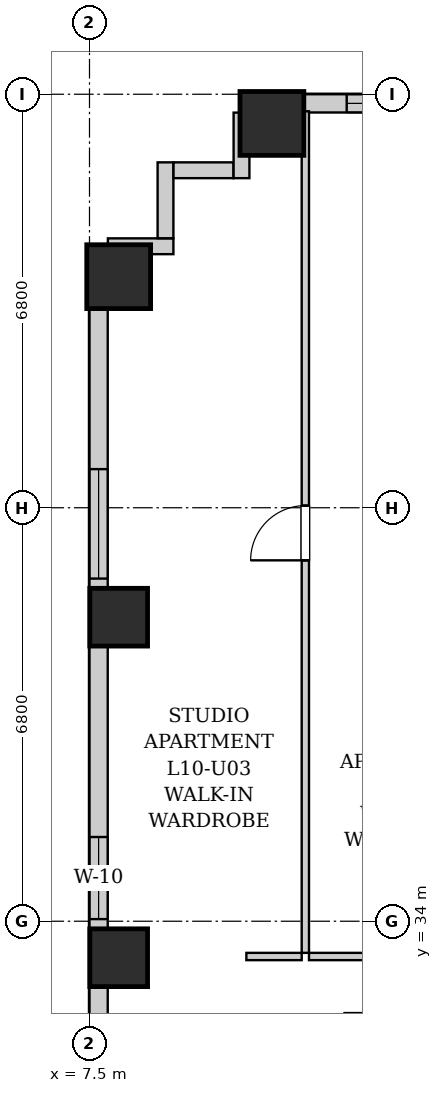
"""IFC4 building model, lengths in metres.
Left out: names, types, materials, properties, quantities, classifications, styles, units other than length and angle.
Written with IfcOpenShell. Run it as: python <this file> out.ifc"""

import sys

from ifc_helpers import new_model, si_unit, direction, frame, frame_2d, origin, origin_2d, place, context, subcontext, project, spatial, rectangle, extrude, element, fill, save


model = new_model("IFC4")
c1 = context("Model", 3, precision=1e-05, world=origin(), true_north=direction((0.0, 1.0)))
c2 = subcontext(c1, "Body", "Model", "MODEL_VIEW")
j1 = project(units=[si_unit("LENGTHUNIT", "METRE"), si_unit("PLANEANGLEUNIT", "RADIAN")], contexts=[c1])
p1 = place(None, origin())
s1 = spatial("IfcSite", under=j1, at=p1, CompositionType="ELEMENT")
p2 = place(p1, origin())
s2 = spatial("IfcBuilding", under=s1, at=p2, CompositionType="ELEMENT")
p3 = place(p2, frame((0.0, 0.0, 41.8)))
s3 = spatial("IfcBuildingStorey", under=s2, at=p3, CompositionType="ELEMENT", Elevation=41.8)
p4 = place(p3, frame((10.5, 47.12, 0.0), z_axis=(0.0, 0.0, 1.0), x_axis=(1.0, 0.0, 0.0)))
e1 = element("IfcColumn", 1, at=p4, inside=s3, PredefinedType="COLUMN", context=c2, shape_type="SweptSolid", body=[
    extrude(rectangle(XDim=1.05, YDim=1.05, at=origin_2d()), origin(), (0.0, 0.0, 1.0), 3.2),
])
for number, where, z_axis, x_axis in (
    (2, (7.98, 33.4, 0.0), (0.0, 0.0, 1.0), (1.0, 0.0, 0.0)),
    (3, (7.98, 39.0, 0.0), (0.0, 0.0, 1.0), (1.0, 0.0, 0.0)),
):
    element("IfcColumn", number, at=place(p3, frame(where, z_axis=z_axis, x_axis=x_axis)), inside=s3, PredefinedType="COLUMN", context=c2, shape_type="SweptSolid", body=[
        extrude(rectangle(XDim=0.95, YDim=0.95, at=origin_2d()), origin(), (0.0, 0.0, 1.0), 3.2),
    ])
p5 = place(p3, frame((7.98, 44.6, 0.0), z_axis=(0.0, 0.0, 1.0), x_axis=(1.0, 0.0, 0.0)))
e4 = element("IfcColumn", 4, at=p5, inside=s3, PredefinedType="COLUMN", context=c2, shape_type="SweptSolid", body=[
    extrude(rectangle(XDim=1.05, YDim=1.05, at=origin_2d()), origin(), (0.0, 0.0, 1.0), 3.2),
])
p6 = place(p3, frame((10.0, 47.45, 0.0), z_axis=(0.0, 0.0, 1.0), x_axis=(1.0, 0.0, 0.0)))
e5 = element("IfcWall", 5, at=p6, inside=s3, PredefinedType="SOLIDWALL", context=c2, shape_type="SweptSolid", body=[
    extrude(rectangle(XDim=25.7, YDim=0.3, at=frame_2d((12.85, 0.0))), origin(), (0.0, 0.0, 1.0), 1.975),
])
p7 = place(p6, frame((1.73, 0.0, 0.55)))
e6 = element("IfcOpeningElement", 6, at=p7, cuts=e5, PredefinedType="OPENING", context=c2, shape_type="SweptSolid", body=[
    extrude(rectangle(XDim=1.8, YDim=1.2, at=frame_2d((0.9, 0.6))), frame((0.0, 0.16, 0.0), z_axis=(0.0, -1.0, 0.0), x_axis=(1.0, 0.0, 0.0)), (0.0, 0.0, 1.0), 0.32),
])
p8 = place(p6, frame((4.961, 0.0, 0.55)))
e7 = element("IfcOpeningElement", 7, at=p8, cuts=e5, PredefinedType="OPENING", context=c2, shape_type="SweptSolid", body=[
    extrude(rectangle(XDim=1.8, YDim=1.2, at=frame_2d((0.9, 0.6))), frame((0.0, 0.16, 0.0), z_axis=(0.0, -1.0, 0.0), x_axis=(1.0, 0.0, 0.0)), (0.0, 0.0, 1.0), 0.32),
])
p9 = place(p6, frame((8.435, 0.0, 0.55)))
e8 = element("IfcOpeningElement", 8, at=p9, cuts=e5, PredefinedType="OPENING", context=c2, shape_type="SweptSolid", body=[
    extrude(rectangle(XDim=1.8, YDim=1.2, at=frame_2d((0.9, 0.6))), frame((0.0, 0.16, 0.0), z_axis=(0.0, -1.0, 0.0), x_axis=(1.0, 0.0, 0.0)), (0.0, 0.0, 1.0), 0.32),
])
p10 = place(p6, frame((11.15, 0.0, 0.55)))
e9 = element("IfcOpeningElement", 9, at=p10, cuts=e5, PredefinedType="OPENING", context=c2, shape_type="SweptSolid", body=[
    extrude(rectangle(XDim=1.35, YDim=1.2, at=frame_2d((0.675, 0.6))), frame((0.0, 0.16, 0.0), z_axis=(0.0, -1.0, 0.0), x_axis=(1.0, 0.0, 0.0)), (0.0, 0.0, 1.0), 0.32),
])
p11 = place(p6, frame((17.812, 0.0, 0.55)))
e10 = element("IfcOpeningElement", 10, at=p11, cuts=e5, PredefinedType="OPENING", context=c2, shape_type="SweptSolid", body=[
    extrude(rectangle(XDim=1.8, YDim=1.2, at=frame_2d((0.9, 0.6))), frame((0.0, 0.16, 0.0), z_axis=(0.0, -1.0, 0.0), x_axis=(1.0, 0.0, 0.0)), (0.0, 0.0, 1.0), 0.32),
])
p12 = place(p6, frame((20.765, 0.0, 0.55)))
e11 = element("IfcOpeningElement", 11, at=p12, cuts=e5, PredefinedType="OPENING", context=c2, shape_type="SweptSolid", body=[
    extrude(rectangle(XDim=1.8, YDim=1.2, at=frame_2d((0.9, 0.6))), frame((0.0, 0.16, 0.0), z_axis=(0.0, -1.0, 0.0), x_axis=(1.0, 0.0, 0.0)), (0.0, 0.0, 1.0), 0.32),
])
p13 = place(p6, frame((23.835, 0.0, 0.55)))
e12 = element("IfcOpeningElement", 12, at=p13, cuts=e5, PredefinedType="OPENING", context=c2, shape_type="SweptSolid", body=[
    extrude(rectangle(XDim=1.35, YDim=1.2, at=frame_2d((0.675, 0.6))), frame((0.0, 0.16, 0.0), z_axis=(0.0, -1.0, 0.0), x_axis=(1.0, 0.0, 0.0)), (0.0, 0.0, 1.0), 0.32),
])
p14 = place(p3, frame((7.65, 19.4, 0.0), z_axis=(0.0, 0.0, 1.0), x_axis=(0.0, 1.0, 0.0)))
e13 = element("IfcWall", 13, at=p14, inside=s3, PredefinedType="SOLIDWALL", context=c2, shape_type="SweptSolid", body=[
    extrude(rectangle(XDim=25.7, YDim=0.3, at=frame_2d((12.85, 0.0))), origin(), (0.0, 0.0, 1.0), 1.975),
])
p15 = place(p14, frame((20.235, 0.0, 0.55)))
e14 = element("IfcOpeningElement", 14, at=p15, cuts=e13, PredefinedType="OPENING", context=c2, shape_type="SweptSolid", body=[
    extrude(rectangle(XDim=1.8, YDim=1.2, at=frame_2d((0.9, 0.6))), frame((0.0, 0.16, 0.0), z_axis=(0.0, -1.0, 0.0), x_axis=(1.0, 0.0, 0.0)), (0.0, 0.0, 1.0), 0.32),
])
p16 = place(p14, frame((14.635, 0.0, 0.55)))
e15 = element("IfcOpeningElement", 15, at=p16, cuts=e13, PredefinedType="OPENING", context=c2, shape_type="SweptSolid", body=[
    extrude(rectangle(XDim=1.35, YDim=1.2, at=frame_2d((0.675, 0.6))), frame((0.0, 0.16, 0.0), z_axis=(0.0, -1.0, 0.0), x_axis=(1.0, 0.0, 0.0)), (0.0, 0.0, 1.0), 0.32),
])
p17 = place(p14, frame((5.1, 0.0, 0.55)))
e16 = element("IfcOpeningElement", 16, at=p17, cuts=e13, PredefinedType="OPENING", context=c2, shape_type="SweptSolid", body=[
    extrude(rectangle(XDim=1.8, YDim=1.2, at=frame_2d((0.9, 0.6))), frame((0.0, 0.16, 0.0), z_axis=(0.0, -1.0, 0.0), x_axis=(1.0, 0.0, 0.0)), (0.0, 0.0, 1.0), 0.32),
])
p18 = place(p14, frame((7.16, 0.0, 0.55)))
e17 = element("IfcOpeningElement", 17, at=p18, cuts=e13, PredefinedType="OPENING", context=c2, shape_type="SweptSolid", body=[
    extrude(rectangle(XDim=1.35, YDim=1.2, at=frame_2d((0.675, 0.6))), frame((0.0, 0.16, 0.0), z_axis=(0.0, -1.0, 0.0), x_axis=(1.0, 0.0, 0.0)), (0.0, 0.0, 1.0), 0.32),
])
p19 = place(p3, frame((7.802, 45.1, 0.0), z_axis=(0.0, 0.0, 1.0), x_axis=(1.0, 0.0, 0.0)))
e18 = element("IfcWall", 18, at=p19, inside=s3, PredefinedType="SOLIDWALL", context=c2, shape_type="SweptSolid", body=[
    extrude(rectangle(XDim=1.078, YDim=0.26, at=frame_2d((0.539, 0.0))), origin(), (0.0, 0.0, 1.0), 2.94),
])
p20 = place(p3, frame((8.75, 45.232, 0.0), z_axis=(0.0, 0.0, 1.0), x_axis=(0.0, 1.0, 0.0)))
e19 = element("IfcWall", 19, at=p20, inside=s3, PredefinedType="SOLIDWALL", context=c2, shape_type="SweptSolid", body=[
    extrude(rectangle(XDim=1.248, YDim=0.26, at=frame_2d((0.624, 0.0))), origin(), (0.0, 0.0, 1.0), 2.94),
])
p21 = place(p3, frame((8.882, 46.35, 0.0), z_axis=(0.0, 0.0, 1.0), x_axis=(1.0, 0.0, 0.0)))
e20 = element("IfcWall", 20, at=p21, inside=s3, PredefinedType="SOLIDWALL", context=c2, shape_type="SweptSolid", body=[
    extrude(rectangle(XDim=0.986, YDim=0.26, at=frame_2d((0.493, 0.0))), origin(), (0.0, 0.0, 1.0), 2.94),
])
p22 = place(p3, frame((10.0, 46.22, 0.0), z_axis=(0.0, 0.0, 1.0), x_axis=(0.0, 1.0, 0.0)))
e21 = element("IfcWall", 21, at=p22, inside=s3, PredefinedType="SOLIDWALL", context=c2, shape_type="SweptSolid", body=[
    extrude(rectangle(XDim=1.078, YDim=0.26, at=frame_2d((0.539, 0.0))), origin(), (0.0, 0.0, 1.0), 2.94),
])
p23 = place(p3, frame((10.08, 33.42, 0.0), z_axis=(0.0, 0.0, 1.0), x_axis=(1.0, 0.0, 0.0)))
e22 = element("IfcWall", 22, at=p23, inside=s3, PredefinedType="PARTITIONING", context=c2, shape_type="SweptSolid", body=[
    extrude(rectangle(XDim=0.91, YDim=0.12, at=frame_2d((0.455, 0.0))), origin(), (0.0, 0.0, 1.0), 2.94),
])
p24 = place(p3, frame((11.11, 33.42, 0.0), z_axis=(0.0, 0.0, 1.0), x_axis=(1.0, 0.0, 0.0)))
e23 = element("IfcWall", 23, at=p24, inside=s3, PredefinedType="PARTITIONING", context=c2, shape_type="SweptSolid", body=[
    extrude(rectangle(XDim=1.37, YDim=0.12, at=frame_2d((0.685, 0.0))), origin(), (0.0, 0.0, 1.0), 2.94),
])
p25 = place(p3, frame((11.05, 33.48, 0.0), z_axis=(0.0, 0.0, 1.0), x_axis=(0.0, 1.0, 0.0)))
e24 = element("IfcWall", 24, at=p25, inside=s3, PredefinedType="PARTITIONING", context=c2, shape_type="SweptSolid", body=[
    extrude(rectangle(XDim=13.84, YDim=0.12, at=frame_2d((6.92, 0.0))), origin(), (0.0, 0.0, 1.0), 2.94),
])
p26 = place(p25, frame((6.455, 0.0, 0.0)))
e25 = element("IfcOpeningElement", 25, at=p26, cuts=e24, PredefinedType="OPENING", context=c2, shape_type="SweptSolid", body=[
    extrude(rectangle(XDim=0.9, YDim=2.05, at=frame_2d((0.45, 1.025))), frame((0.0, 0.07, 0.0), z_axis=(0.0, -1.0, 0.0), x_axis=(1.0, 0.0, 0.0)), (0.0, 0.0, 1.0), 0.14),
])
p27 = place(p26, origin())
e26 = element("IfcDoor", 26, at=p27, inside=s3, OperationType="SINGLE_SWING_LEFT", PredefinedType="DOOR", context=c2, shape_type="SweptSolid", body=[
    extrude(rectangle(XDim=0.9, YDim=2.05, at=frame_2d((0.45, 1.025))), frame((0.0, 0.025, 0.0), z_axis=(0.0, -1.0, 0.0), x_axis=(1.0, 0.0, 0.0)), (0.0, 0.0, 1.0), 0.05),
])
fill(e25, e26)
p28 = place(p15, origin())
e27 = element("IfcWindow", 27, at=p28, inside=s3, PartitioningType="DOUBLE_PANEL_VERTICAL", PredefinedType="WINDOW", context=c2, shape_type="SweptSolid", body=[
    extrude(rectangle(XDim=1.8, YDim=1.2, at=frame_2d((0.9, 0.6))), frame((0.0, 0.03, 0.0), z_axis=(0.0, -1.0, 0.0), x_axis=(1.0, 0.0, 0.0)), (0.0, 0.0, 1.0), 0.06),
])
fill(e14, e27)
p29 = place(p16, origin())
e28 = element("IfcWindow", 28, at=p29, inside=s3, PartitioningType="SINGLE_PANEL", PredefinedType="WINDOW", context=c2, shape_type="SweptSolid", body=[
    extrude(rectangle(XDim=1.35, YDim=1.2, at=frame_2d((0.675, 0.6))), frame((0.0, 0.03, 0.0), z_axis=(0.0, -1.0, 0.0), x_axis=(1.0, 0.0, 0.0)), (0.0, 0.0, 1.0), 0.06),
])
fill(e15, e28)
p30 = place(p7, origin())
e29 = element("IfcWindow", 29, at=p30, inside=s3, PartitioningType="DOUBLE_PANEL_VERTICAL", PredefinedType="WINDOW", context=c2, shape_type="SweptSolid", body=[
    extrude(rectangle(XDim=1.8, YDim=1.2, at=frame_2d((0.9, 0.6))), frame((0.0, 0.03, 0.0), z_axis=(0.0, -1.0, 0.0), x_axis=(1.0, 0.0, 0.0)), (0.0, 0.0, 1.0), 0.06),
])
fill(e6, e29)
save(model, sys.argv[1])
